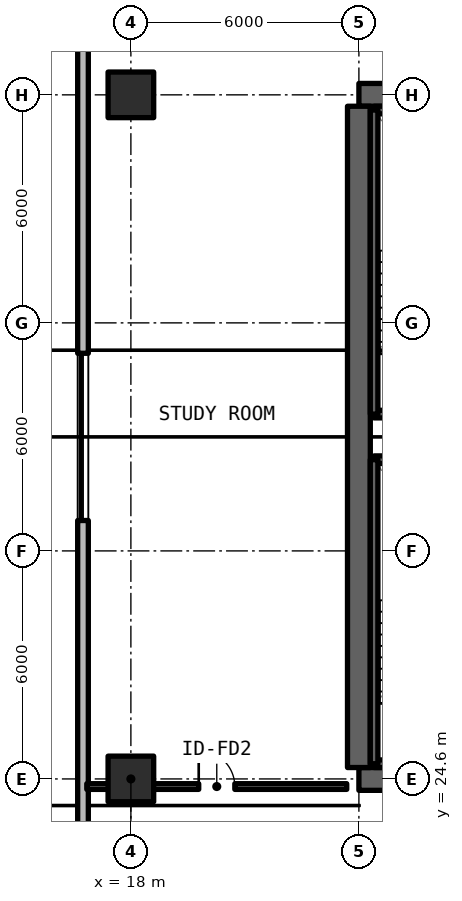
"""IFC4 building model, lengths in metres.
Left out: names, types, materials, properties, quantities, classifications, styles, units other than length and angle.
Written with IfcOpenShell. Run it as: python <this file> out.ifc"""

import sys

from ifc_helpers import new_model, si_unit, direction, frame, frame_2d, origin, origin_2d, place, context, subcontext, project, spatial, rectangle, extrude, element, fill, save


model = new_model("IFC4")
c1 = context("Model", 3, precision=1e-05, world=origin(), true_north=direction((0.0, 1.0)))
c2 = subcontext(c1, "Body", "Model", "MODEL_VIEW")
j1 = project(units=[si_unit("LENGTHUNIT", "METRE"), si_unit("PLANEANGLEUNIT", "RADIAN")], contexts=[c1])
p1 = place(None, origin())
s1 = spatial("IfcSite", under=j1, at=p1, CompositionType="ELEMENT")
p2 = place(p1, origin())
s2 = spatial("IfcBuilding", under=s1, at=p2, CompositionType="ELEMENT")
p3 = place(p2, frame((0.0, 0.0, 38.94)))
s3 = spatial("IfcBuildingStorey", under=s2, at=p3, CompositionType="ELEMENT", Elevation=38.94)
for number, where, z_axis, x_axis in (
    (1, (24.0, 24.6, 0.0), (0.0, 0.0, 1.0), (1.0, 0.0, 0.0)),
    (2, (36.0, 42.6, 0.0), (0.0, 0.0, 1.0), (-1.0, 0.0, 0.0)),
):
    element("IfcWall", number, at=place(p3, frame(where, z_axis=z_axis, x_axis=x_axis)), inside=s3, PredefinedType="SHEAR", context=c2, shape_type="SweptSolid", body=[
        extrude(rectangle(XDim=12.0, YDim=0.6, at=frame_2d((6.0, 0.0))), origin(), (0.0, 0.0, 1.0), 3.3),
    ])
p4 = place(p3, frame((24.0, 24.9, 0.0), z_axis=(0.0, 0.0, 1.0), x_axis=(0.0, 1.0, 0.0)))
e3 = element("IfcWall", 3, at=p4, inside=s3, PredefinedType="SHEAR", context=c2, shape_type="SweptSolid", body=[
    extrude(rectangle(XDim=17.4, YDim=0.6, at=frame_2d((8.7, 0.0))), origin(), (0.0, 0.0, 1.0), 3.3),
])
for number, where, z_axis, x_axis in (
    (4, (18.0, 24.6, 0.0), (0.0, 0.0, 1.0), (1.0, 0.0, 0.0)),
    (5, (18.0, 42.6, 0.0), (0.0, 0.0, 1.0), (1.0, 0.0, 0.0)),
):
    element("IfcColumn", number, at=place(p3, frame(where, z_axis=z_axis, x_axis=x_axis)), inside=s3, PredefinedType="COLUMN", context=c2, shape_type="SweptSolid", body=[
        extrude(rectangle(XDim=1.2, YDim=1.2, at=origin_2d()), origin(), (0.0, 0.0, 1.0), 3.3),
    ])
p5 = place(p3, frame((16.74, 55.342, 0.0), z_axis=(0.0, 0.0, 1.0), x_axis=(0.0, -1.0, 0.0)))
e6 = element("IfcWall", 6, at=p5, inside=s3, PredefinedType="SOLIDWALL", context=c2, shape_type="SweptSolid", body=[
    extrude(rectangle(XDim=43.484, YDim=0.28, at=frame_2d((21.742, 0.0))), origin(), (0.0, 0.0, 1.0), 3.08),
])
p6 = place(p5, frame((38.942, 0.0, 0.0)))
e7 = element("IfcOpeningElement", 7, at=p6, cuts=e6, PredefinedType="OPENING", context=c2, shape_type="SweptSolid", body=[
    extrude(rectangle(XDim=1.1, YDim=2.15, at=frame_2d((0.55, 1.075))), frame((0.0, 0.15, 0.0), z_axis=(0.0, -1.0, 0.0), x_axis=(1.0, 0.0, 0.0)), (0.0, 0.0, 1.0), 0.3),
])
p7 = place(p5, frame((19.542, 0.0, 0.78)))
e8 = element("IfcOpeningElement", 8, at=p7, cuts=e6, PredefinedType="OPENING", context=c2, shape_type="SweptSolid", body=[
    extrude(rectangle(XDim=4.4, YDim=1.66, at=frame_2d((2.2, 0.83))), frame((0.0, 0.15, 0.0), z_axis=(0.0, -1.0, 0.0), x_axis=(1.0, 0.0, 0.0)), (0.0, 0.0, 1.0), 0.3),
])
p8 = place(p3, frame((16.84, 24.4, 0.0), z_axis=(0.0, 0.0, 1.0), x_axis=(1.0, 0.0, 0.0)))
e9 = element("IfcWall", 9, at=p8, inside=s3, PredefinedType="SOLIDWALL", context=c2, shape_type="SweptSolid", body=[
    extrude(rectangle(XDim=6.84, YDim=0.15, at=frame_2d((3.42, 0.0))), origin(), (0.0, 0.0, 1.0), 2.295),
])
p9 = place(p8, frame((2.945, 0.0, 0.0)))
e10 = element("IfcOpeningElement", 10, at=p9, cuts=e9, PredefinedType="OPENING", context=c2, shape_type="SweptSolid", body=[
    extrude(rectangle(XDim=0.95, YDim=2.15, at=frame_2d((0.475, 1.075))), frame((0.0, 0.085, 0.0), z_axis=(0.0, -1.0, 0.0), x_axis=(1.0, 0.0, 0.0)), (0.0, 0.0, 1.0), 0.17),
])
for number, where, z_axis, x_axis in (
    (11, (24.4, 25.0, 0.0), (0.0, 0.0, 1.0), (1.0, 0.0, 0.0)),
    (12, (27.8, 33.0, 0.0), (0.0, 0.0, 1.0), (-1.0, 0.0, 0.0)),
):
    element("IfcWall", number, at=place(p3, frame(where, z_axis=z_axis, x_axis=x_axis)), inside=s3, PredefinedType="SOLIDWALL", context=c2, shape_type="SweptSolid", body=[
        extrude(rectangle(XDim=3.4, YDim=0.2, at=frame_2d((1.7, 0.0))), origin(), (0.0, 0.0, 1.0), 3.3),
    ])
p10 = place(p3, frame((24.4, 33.0, 0.0), z_axis=(0.0, 0.0, 1.0), x_axis=(0.0, -1.0, 0.0)))
e13 = element("IfcWall", 13, at=p10, inside=s3, PredefinedType="SOLIDWALL", context=c2, shape_type="SweptSolid", body=[
    extrude(rectangle(XDim=8.0, YDim=0.2, at=frame_2d((4.0, 0.0))), origin(), (0.0, 0.0, 1.0), 3.3),
])
for number, where, z_axis, x_axis in (
    (14, (24.4, 34.2, 0.0), (0.0, 0.0, 1.0), (1.0, 0.0, 0.0)),
    (15, (27.8, 42.2, 0.0), (0.0, 0.0, 1.0), (-1.0, 0.0, 0.0)),
):
    element("IfcWall", number, at=place(p3, frame(where, z_axis=z_axis, x_axis=x_axis)), inside=s3, PredefinedType="SOLIDWALL", context=c2, shape_type="SweptSolid", body=[
        extrude(rectangle(XDim=3.4, YDim=0.2, at=frame_2d((1.7, 0.0))), origin(), (0.0, 0.0, 1.0), 3.3),
    ])
p11 = place(p3, frame((24.4, 42.2, 0.0), z_axis=(0.0, 0.0, 1.0), x_axis=(0.0, -1.0, 0.0)))
e16 = element("IfcWall", 16, at=p11, inside=s3, PredefinedType="SOLIDWALL", context=c2, shape_type="SweptSolid", body=[
    extrude(rectangle(XDim=8.0, YDim=0.2, at=frame_2d((4.0, 0.0))), origin(), (0.0, 0.0, 1.0), 3.3),
])
p12 = place(p7, origin())
e17 = element("IfcWindow", 17, at=p12, inside=s3, PartitioningType="SINGLE_PANEL", PredefinedType="WINDOW", context=c2, shape_type="SweptSolid", body=[
    extrude(rectangle(XDim=4.4, YDim=1.66, at=frame_2d((2.2, 0.83))), frame((0.0, 0.03, 0.0), z_axis=(0.0, -1.0, 0.0), x_axis=(1.0, 0.0, 0.0)), (0.0, 0.0, 1.0), 0.06),
])
fill(e8, e17)
p13 = place(p9, origin())
e18 = element("IfcDoor", 18, at=p13, inside=s3, OperationType="SINGLE_SWING_LEFT", PredefinedType="DOOR", context=c2, shape_type="SweptSolid", body=[
    extrude(rectangle(XDim=0.95, YDim=2.15, at=frame_2d((0.475, 1.075))), frame((0.0, 0.025, 0.0), z_axis=(0.0, -1.0, 0.0), x_axis=(1.0, 0.0, 0.0)), (0.0, 0.0, 1.0), 0.05),
])
fill(e10, e18)
save(model, sys.argv[1])
